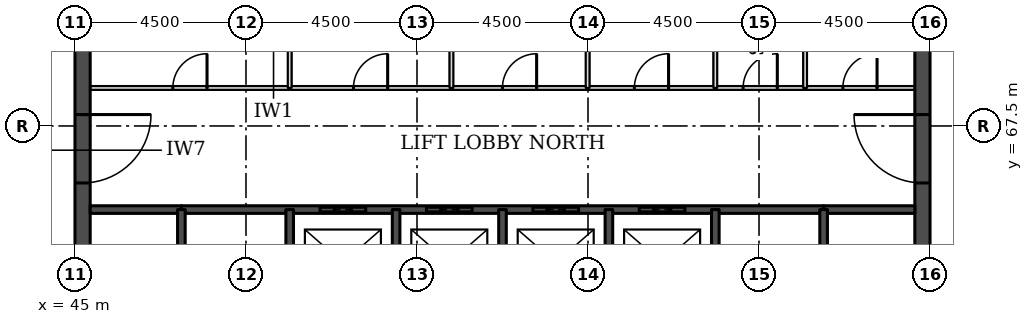
"""IFC4 building model, lengths in metres.
Left out: names, types, materials, properties, quantities, classifications, styles, units other than length and angle.
Written with IfcOpenShell. Run it as: python <this file> out.ifc"""

import sys

from ifc_helpers import new_model, si_unit, direction, frame, frame_2d, origin, place, context, subcontext, project, spatial, rectangle, extrude, element, fill, save


model = new_model("IFC4")
c1 = context("Model", 3, precision=1e-05, world=origin(), true_north=direction((0.0, 1.0)))
c2 = subcontext(c1, "Body", "Model", "MODEL_VIEW")
j1 = project(units=[si_unit("LENGTHUNIT", "METRE"), si_unit("PLANEANGLEUNIT", "RADIAN")], contexts=[c1])
p1 = place(None, origin())
s1 = spatial("IfcSite", under=j1, at=p1, CompositionType="ELEMENT")
p2 = place(p1, origin())
s2 = spatial("IfcBuilding", under=s1, at=p2, CompositionType="ELEMENT")
p3 = place(p2, frame((0.0, 0.0, 203.2)))
s3 = spatial("IfcBuildingStorey", under=s2, at=p3, CompositionType="ELEMENT", Elevation=203.2)
p4 = place(p3, frame((45.2, 49.5, 0.0), z_axis=(0.0, 0.0, 1.0), x_axis=(0.0, 1.0, 0.0)))
e1 = element("IfcWall", 1, at=p4, inside=s3, PredefinedType="SHEAR", context=c2, shape_type="SweptSolid", body=[
    extrude(rectangle(XDim=22.5, YDim=0.4, at=frame_2d((11.25, 0.0))), origin(), (0.0, 0.0, 1.0), 3.7),
])
p5 = place(p4, frame((4.2, 0.0, 0.0)))
e2 = element("IfcOpeningElement", 2, at=p5, cuts=e1, PredefinedType="OPENING", context=c2, shape_type="SweptSolid", body=[
    extrude(rectangle(XDim=1.8, YDim=2.1, at=frame_2d((0.9, 1.05))), frame((0.0, 0.21, 0.0), z_axis=(0.0, -1.0, 0.0), x_axis=(1.0, 0.0, 0.0)), (0.0, 0.0, 1.0), 0.42),
])
p6 = place(p4, frame((6.9, 0.0, 0.0)))
e3 = element("IfcOpeningElement", 3, at=p6, cuts=e1, PredefinedType="OPENING", context=c2, shape_type="SweptSolid", body=[
    extrude(rectangle(XDim=1.1, YDim=2.1, at=frame_2d((0.55, 1.05))), frame((0.0, 0.21, 0.0), z_axis=(0.0, -1.0, 0.0), x_axis=(1.0, 0.0, 0.0)), (0.0, 0.0, 1.0), 0.42),
])
p7 = place(p4, frame((13.6, 0.0, 0.0)))
e4 = element("IfcOpeningElement", 4, at=p7, cuts=e1, PredefinedType="OPENING", context=c2, shape_type="SweptSolid", body=[
    extrude(rectangle(XDim=1.1, YDim=2.1, at=frame_2d((0.55, 1.05))), frame((0.0, 0.21, 0.0), z_axis=(0.0, -1.0, 0.0), x_axis=(1.0, 0.0, 0.0)), (0.0, 0.0, 1.0), 0.42),
])
p8 = place(p4, frame((16.5, 0.0, 0.0)))
e5 = element("IfcOpeningElement", 5, at=p8, cuts=e1, PredefinedType="OPENING", context=c2, shape_type="SweptSolid", body=[
    extrude(rectangle(XDim=1.8, YDim=2.1, at=frame_2d((0.9, 1.05))), frame((0.0, 0.21, 0.0), z_axis=(0.0, -1.0, 0.0), x_axis=(1.0, 0.0, 0.0)), (0.0, 0.0, 1.0), 0.42),
])
p9 = place(p3, frame((67.3, 49.5, 0.0), z_axis=(0.0, 0.0, 1.0), x_axis=(0.0, 1.0, 0.0)))
e6 = element("IfcWall", 6, at=p9, inside=s3, PredefinedType="SHEAR", context=c2, shape_type="SweptSolid", body=[
    extrude(rectangle(XDim=22.5, YDim=0.4, at=frame_2d((11.25, 0.0))), origin(), (0.0, 0.0, 1.0), 3.7),
])
p10 = place(p9, frame((4.2, 0.0, 0.0)))
e7 = element("IfcOpeningElement", 7, at=p10, cuts=e6, PredefinedType="OPENING", context=c2, shape_type="SweptSolid", body=[
    extrude(rectangle(XDim=1.8, YDim=2.1, at=frame_2d((0.9, 1.05))), frame((0.0, 0.21, 0.0), z_axis=(0.0, -1.0, 0.0), x_axis=(1.0, 0.0, 0.0)), (0.0, 0.0, 1.0), 0.42),
])
p11 = place(p9, frame((6.9, 0.0, 0.0)))
e8 = element("IfcOpeningElement", 8, at=p11, cuts=e6, PredefinedType="OPENING", context=c2, shape_type="SweptSolid", body=[
    extrude(rectangle(XDim=1.1, YDim=2.1, at=frame_2d((0.55, 1.05))), frame((0.0, 0.21, 0.0), z_axis=(0.0, -1.0, 0.0), x_axis=(1.0, 0.0, 0.0)), (0.0, 0.0, 1.0), 0.42),
])
p12 = place(p9, frame((13.6, 0.0, 0.0)))
e9 = element("IfcOpeningElement", 9, at=p12, cuts=e6, PredefinedType="OPENING", context=c2, shape_type="SweptSolid", body=[
    extrude(rectangle(XDim=1.1, YDim=2.1, at=frame_2d((0.55, 1.05))), frame((0.0, 0.21, 0.0), z_axis=(0.0, -1.0, 0.0), x_axis=(1.0, 0.0, 0.0)), (0.0, 0.0, 1.0), 0.42),
])
p13 = place(p9, frame((16.5, 0.0, 0.0)))
e10 = element("IfcOpeningElement", 10, at=p13, cuts=e6, PredefinedType="OPENING", context=c2, shape_type="SweptSolid", body=[
    extrude(rectangle(XDim=1.8, YDim=2.1, at=frame_2d((0.9, 1.05))), frame((0.0, 0.21, 0.0), z_axis=(0.0, -1.0, 0.0), x_axis=(1.0, 0.0, 0.0)), (0.0, 0.0, 1.0), 0.42),
])
for number, where, z_axis, x_axis in (
    (11, (45.4, 65.3, 0.0), (0.0, 0.0, 1.0), (1.0, 0.0, 0.0)),
    (12, (64.7, 65.3, 0.0), (0.0, 0.0, 1.0), (1.0, 0.0, 0.0)),
):
    element("IfcWall", number, at=place(p3, frame(where, z_axis=z_axis, x_axis=x_axis)), inside=s3, PredefinedType="SOLIDWALL", context=c2, shape_type="SweptSolid", body=[
        extrude(rectangle(XDim=2.4, YDim=0.2, at=frame_2d((1.2, 0.0))), origin(), (0.0, 0.0, 1.0), 3.55),
    ])
p14 = place(p3, frame((47.8, 65.3, 0.0), z_axis=(0.0, 0.0, 1.0), x_axis=(1.0, 0.0, 0.0)))
e13 = element("IfcWall", 13, at=p14, inside=s3, PredefinedType="SOLIDWALL", context=c2, shape_type="SweptSolid", body=[
    extrude(rectangle(XDim=16.9, YDim=0.2, at=frame_2d((8.45, 0.0))), origin(), (0.0, 0.0, 1.0), 3.55),
])
p15 = place(p14, frame((3.65, 0.0, 0.0)))
e14 = element("IfcOpeningElement", 14, at=p15, cuts=e13, PredefinedType="OPENING", context=c2, shape_type="SweptSolid", body=[
    extrude(rectangle(XDim=1.2, YDim=2.1, at=frame_2d((0.6, 1.05))), frame((0.0, 0.11, 0.0), z_axis=(0.0, -1.0, 0.0), x_axis=(1.0, 0.0, 0.0)), (0.0, 0.0, 1.0), 0.22),
])
p16 = place(p14, frame((6.45, 0.0, 0.0)))
e15 = element("IfcOpeningElement", 15, at=p16, cuts=e13, PredefinedType="OPENING", context=c2, shape_type="SweptSolid", body=[
    extrude(rectangle(XDim=1.2, YDim=2.1, at=frame_2d((0.6, 1.05))), frame((0.0, 0.11, 0.0), z_axis=(0.0, -1.0, 0.0), x_axis=(1.0, 0.0, 0.0)), (0.0, 0.0, 1.0), 0.22),
])
p17 = place(p14, frame((9.25, 0.0, 0.0)))
e16 = element("IfcOpeningElement", 16, at=p17, cuts=e13, PredefinedType="OPENING", context=c2, shape_type="SweptSolid", body=[
    extrude(rectangle(XDim=1.2, YDim=2.1, at=frame_2d((0.6, 1.05))), frame((0.0, 0.11, 0.0), z_axis=(0.0, -1.0, 0.0), x_axis=(1.0, 0.0, 0.0)), (0.0, 0.0, 1.0), 0.22),
])
p18 = place(p14, frame((12.05, 0.0, 0.0)))
e17 = element("IfcOpeningElement", 17, at=p18, cuts=e13, PredefinedType="OPENING", context=c2, shape_type="SweptSolid", body=[
    extrude(rectangle(XDim=1.2, YDim=2.1, at=frame_2d((0.6, 1.05))), frame((0.0, 0.11, 0.0), z_axis=(0.0, -1.0, 0.0), x_axis=(1.0, 0.0, 0.0)), (0.0, 0.0, 1.0), 0.22),
])
p19 = place(p3, frame((45.4, 68.5, 0.0), z_axis=(0.0, 0.0, 1.0), x_axis=(1.0, 0.0, 0.0)))
e18 = element("IfcWall", 18, at=p19, inside=s3, PredefinedType="PARTITIONING", context=c2, shape_type="SweptSolid", body=[
    extrude(rectangle(XDim=21.7, YDim=0.1, at=frame_2d((10.85, 0.0))), origin(), (0.0, 0.0, 1.0), 3.55),
])
p20 = place(p19, frame((19.806, 0.0, 0.0)))
e19 = element("IfcOpeningElement", 19, at=p20, cuts=e18, PredefinedType="OPENING", context=c2, shape_type="SweptSolid", body=[
    extrude(rectangle(XDim=0.9, YDim=2.1, at=frame_2d((0.45, 1.05))), frame((0.0, 0.06, 0.0), z_axis=(0.0, -1.0, 0.0), x_axis=(1.0, 0.0, 0.0)), (0.0, 0.0, 1.0), 0.12),
])
p21 = place(p19, frame((17.181, 0.0, 0.0)))
e20 = element("IfcOpeningElement", 20, at=p21, cuts=e18, PredefinedType="OPENING", context=c2, shape_type="SweptSolid", body=[
    extrude(rectangle(XDim=0.9, YDim=2.1, at=frame_2d((0.45, 1.05))), frame((0.0, 0.06, 0.0), z_axis=(0.0, -1.0, 0.0), x_axis=(1.0, 0.0, 0.0)), (0.0, 0.0, 1.0), 0.12),
])
p22 = place(p19, frame((2.175, 0.0, 0.0)))
e21 = element("IfcOpeningElement", 21, at=p22, cuts=e18, PredefinedType="OPENING", context=c2, shape_type="SweptSolid", body=[
    extrude(rectangle(XDim=0.9, YDim=2.1, at=frame_2d((0.45, 1.05))), frame((0.0, 0.06, 0.0), z_axis=(0.0, -1.0, 0.0), x_axis=(1.0, 0.0, 0.0)), (0.0, 0.0, 1.0), 0.12),
])
p23 = place(p19, frame((14.32, 0.0, 0.0)))
e22 = element("IfcOpeningElement", 22, at=p23, cuts=e18, PredefinedType="OPENING", context=c2, shape_type="SweptSolid", body=[
    extrude(rectangle(XDim=0.9, YDim=2.1, at=frame_2d((0.45, 1.05))), frame((0.0, 0.06, 0.0), z_axis=(0.0, -1.0, 0.0), x_axis=(1.0, 0.0, 0.0)), (0.0, 0.0, 1.0), 0.12),
])
p24 = place(p19, frame((10.848, 0.0, 0.0)))
e23 = element("IfcOpeningElement", 23, at=p24, cuts=e18, PredefinedType="OPENING", context=c2, shape_type="SweptSolid", body=[
    extrude(rectangle(XDim=0.9, YDim=2.1, at=frame_2d((0.45, 1.05))), frame((0.0, 0.06, 0.0), z_axis=(0.0, -1.0, 0.0), x_axis=(1.0, 0.0, 0.0)), (0.0, 0.0, 1.0), 0.12),
])
p25 = place(p19, frame((6.928, 0.0, 0.0)))
e24 = element("IfcOpeningElement", 24, at=p25, cuts=e18, PredefinedType="OPENING", context=c2, shape_type="SweptSolid", body=[
    extrude(rectangle(XDim=0.9, YDim=2.1, at=frame_2d((0.45, 1.05))), frame((0.0, 0.06, 0.0), z_axis=(0.0, -1.0, 0.0), x_axis=(1.0, 0.0, 0.0)), (0.0, 0.0, 1.0), 0.12),
])
p26 = place(p3, frame((47.8, 62.0, 0.0), z_axis=(0.0, 0.0, 1.0), x_axis=(0.0, 1.0, 0.0)))
e25 = element("IfcWall", 25, at=p26, inside=s3, PredefinedType="SOLIDWALL", context=c2, shape_type="SweptSolid", body=[
    extrude(rectangle(XDim=3.3, YDim=0.2, at=frame_2d((1.65, 0.0))), origin(), (0.0, 0.0, 1.0), 3.55),
])
p27 = place(p26, frame((1.1, 0.0, 0.0)))
e26 = element("IfcOpeningElement", 26, at=p27, cuts=e25, PredefinedType="OPENING", context=c2, shape_type="SweptSolid", body=[
    extrude(rectangle(XDim=1.1, YDim=2.1, at=frame_2d((0.55, 1.05))), frame((0.0, 0.11, 0.0), z_axis=(0.0, -1.0, 0.0), x_axis=(1.0, 0.0, 0.0)), (0.0, 0.0, 1.0), 0.22),
])
p28 = place(p3, frame((50.65, 68.5, 0.0), z_axis=(0.0, 0.0, 1.0), x_axis=(0.0, 1.0, 0.0)))
e27 = element("IfcWall", 27, at=p28, inside=s3, PredefinedType="PARTITIONING", context=c2, shape_type="SweptSolid", body=[
    extrude(rectangle(XDim=3.1, YDim=0.1, at=frame_2d((1.55, 0.0))), origin(), (0.0, 0.0, 1.0), 3.55),
])
p29 = place(p3, frame((50.65, 62.0, 0.0), z_axis=(0.0, 0.0, 1.0), x_axis=(0.0, 1.0, 0.0)))
e28 = element("IfcWall", 28, at=p29, inside=s3, PredefinedType="SOLIDWALL", context=c2, shape_type="SweptSolid", body=[
    extrude(rectangle(XDim=3.3, YDim=0.2, at=frame_2d((1.65, 0.0))), origin(), (0.0, 0.0, 1.0), 3.55),
])
p30 = place(p3, frame((53.45, 62.5, 0.0), z_axis=(0.0, 0.0, 1.0), x_axis=(0.0, 1.0, 0.0)))
e29 = element("IfcWall", 29, at=p30, inside=s3, PredefinedType="SOLIDWALL", context=c2, shape_type="SweptSolid", body=[
    extrude(rectangle(XDim=2.8, YDim=0.2, at=frame_2d((1.4, 0.0))), origin(), (0.0, 0.0, 1.0), 3.55),
])
p31 = place(p3, frame((54.906, 68.5, 0.0), z_axis=(0.0, 0.0, 1.0), x_axis=(0.0, 1.0, 0.0)))
e30 = element("IfcWall", 30, at=p31, inside=s3, PredefinedType="PARTITIONING", context=c2, shape_type="SweptSolid", body=[
    extrude(rectangle(XDim=3.1, YDim=0.1, at=frame_2d((1.55, 0.0))), origin(), (0.0, 0.0, 1.0), 3.55),
])
p32 = place(p3, frame((56.25, 62.5, 0.0), z_axis=(0.0, 0.0, 1.0), x_axis=(0.0, 1.0, 0.0)))
e31 = element("IfcWall", 31, at=p32, inside=s3, PredefinedType="SOLIDWALL", context=c2, shape_type="SweptSolid", body=[
    extrude(rectangle(XDim=2.8, YDim=0.2, at=frame_2d((1.4, 0.0))), origin(), (0.0, 0.0, 1.0), 3.55),
])
p33 = place(p3, frame((58.49, 68.5, 0.0), z_axis=(0.0, 0.0, 1.0), x_axis=(0.0, 1.0, 0.0)))
e32 = element("IfcWall", 32, at=p33, inside=s3, PredefinedType="PARTITIONING", context=c2, shape_type="SweptSolid", body=[
    extrude(rectangle(XDim=3.1, YDim=0.1, at=frame_2d((1.55, 0.0))), origin(), (0.0, 0.0, 1.0), 3.55),
])
p34 = place(p3, frame((59.05, 62.5, 0.0), z_axis=(0.0, 0.0, 1.0), x_axis=(0.0, 1.0, 0.0)))
e33 = element("IfcWall", 33, at=p34, inside=s3, PredefinedType="SOLIDWALL", context=c2, shape_type="SweptSolid", body=[
    extrude(rectangle(XDim=2.8, YDim=0.2, at=frame_2d((1.4, 0.0))), origin(), (0.0, 0.0, 1.0), 3.55),
])
p35 = place(p3, frame((61.85, 68.5, 0.0), z_axis=(0.0, 0.0, 1.0), x_axis=(0.0, 1.0, 0.0)))
e34 = element("IfcWall", 34, at=p35, inside=s3, PredefinedType="PARTITIONING", context=c2, shape_type="SweptSolid", body=[
    extrude(rectangle(XDim=3.1, YDim=0.1, at=frame_2d((1.55, 0.0))), origin(), (0.0, 0.0, 1.0), 3.55),
])
p36 = place(p3, frame((61.85, 62.0, 0.0), z_axis=(0.0, 0.0, 1.0), x_axis=(0.0, 1.0, 0.0)))
e35 = element("IfcWall", 35, at=p36, inside=s3, PredefinedType="SOLIDWALL", context=c2, shape_type="SweptSolid", body=[
    extrude(rectangle(XDim=3.3, YDim=0.2, at=frame_2d((1.65, 0.0))), origin(), (0.0, 0.0, 1.0), 3.55),
])
p37 = place(p3, frame((64.212, 68.5, 0.0), z_axis=(0.0, 0.0, 1.0), x_axis=(0.0, 1.0, 0.0)))
e36 = element("IfcWall", 36, at=p37, inside=s3, PredefinedType="PARTITIONING", context=c2, shape_type="SweptSolid", body=[
    extrude(rectangle(XDim=3.1, YDim=0.1, at=frame_2d((1.55, 0.0))), origin(), (0.0, 0.0, 1.0), 3.55),
])
p38 = place(p3, frame((64.7, 62.0, 0.0), z_axis=(0.0, 0.0, 1.0), x_axis=(0.0, 1.0, 0.0)))
e37 = element("IfcWall", 37, at=p38, inside=s3, PredefinedType="SOLIDWALL", context=c2, shape_type="SweptSolid", body=[
    extrude(rectangle(XDim=3.3, YDim=0.2, at=frame_2d((1.65, 0.0))), origin(), (0.0, 0.0, 1.0), 3.55),
])
p39 = place(p38, frame((1.1, 0.0, 0.0)))
e38 = element("IfcOpeningElement", 38, at=p39, cuts=e37, PredefinedType="OPENING", context=c2, shape_type="SweptSolid", body=[
    extrude(rectangle(XDim=1.1, YDim=2.1, at=frame_2d((0.55, 1.05))), frame((0.0, 0.11, 0.0), z_axis=(0.0, -1.0, 0.0), x_axis=(1.0, 0.0, 0.0)), (0.0, 0.0, 1.0), 0.22),
])
p40 = place(p15, origin())
e39 = element("IfcDoor", 39, at=p40, inside=s3, OperationType="DOUBLE_DOOR_SLIDING", PredefinedType="DOOR", context=c2, shape_type="SweptSolid", body=[
    extrude(rectangle(XDim=1.2, YDim=2.1, at=frame_2d((0.6, 1.05))), frame((0.0, 0.025, 0.0), z_axis=(0.0, -1.0, 0.0), x_axis=(1.0, 0.0, 0.0)), (0.0, 0.0, 1.0), 0.05),
])
fill(e14, e39)
p41 = place(p16, origin())
e40 = element("IfcDoor", 40, at=p41, inside=s3, OperationType="DOUBLE_DOOR_SLIDING", PredefinedType="DOOR", context=c2, shape_type="SweptSolid", body=[
    extrude(rectangle(XDim=1.2, YDim=2.1, at=frame_2d((0.6, 1.05))), frame((0.0, 0.025, 0.0), z_axis=(0.0, -1.0, 0.0), x_axis=(1.0, 0.0, 0.0)), (0.0, 0.0, 1.0), 0.05),
])
fill(e15, e40)
p42 = place(p17, origin())
e41 = element("IfcDoor", 41, at=p42, inside=s3, OperationType="DOUBLE_DOOR_SLIDING", PredefinedType="DOOR", context=c2, shape_type="SweptSolid", body=[
    extrude(rectangle(XDim=1.2, YDim=2.1, at=frame_2d((0.6, 1.05))), frame((0.0, 0.025, 0.0), z_axis=(0.0, -1.0, 0.0), x_axis=(1.0, 0.0, 0.0)), (0.0, 0.0, 1.0), 0.05),
])
fill(e16, e41)
p43 = place(p18, origin())
e42 = element("IfcDoor", 42, at=p43, inside=s3, OperationType="DOUBLE_DOOR_SLIDING", PredefinedType="DOOR", context=c2, shape_type="SweptSolid", body=[
    extrude(rectangle(XDim=1.2, YDim=2.1, at=frame_2d((0.6, 1.05))), frame((0.0, 0.025, 0.0), z_axis=(0.0, -1.0, 0.0), x_axis=(1.0, 0.0, 0.0)), (0.0, 0.0, 1.0), 0.05),
])
fill(e17, e42)
p44 = place(p8, frame((1.8, 0.0, 0.0), z_axis=(0.0, 0.0, 1.0), x_axis=(-1.0, 0.0, 0.0)))
e43 = element("IfcDoor", 43, at=p44, inside=s3, OperationType="SINGLE_SWING_LEFT", PredefinedType="DOOR", context=c2, shape_type="SweptSolid", body=[
    extrude(rectangle(XDim=1.8, YDim=2.1, at=frame_2d((0.9, 1.05))), frame((0.0, 0.025, 0.0), z_axis=(0.0, -1.0, 0.0), x_axis=(1.0, 0.0, 0.0)), (0.0, 0.0, 1.0), 0.05),
])
fill(e5, e43)
p45 = place(p13, origin())
e44 = element("IfcDoor", 44, at=p45, inside=s3, OperationType="SINGLE_SWING_RIGHT", PredefinedType="DOOR", context=c2, shape_type="SweptSolid", body=[
    extrude(rectangle(XDim=1.8, YDim=2.1, at=frame_2d((0.9, 1.05))), frame((0.0, 0.025, 0.0), z_axis=(0.0, -1.0, 0.0), x_axis=(1.0, 0.0, 0.0)), (0.0, 0.0, 1.0), 0.05),
])
fill(e10, e44)
p46 = place(p20, origin())
e45 = element("IfcDoor", 45, at=p46, inside=s3, OperationType="SINGLE_SWING_RIGHT", PredefinedType="DOOR", context=c2, shape_type="SweptSolid", body=[
    extrude(rectangle(XDim=0.9, YDim=2.1, at=frame_2d((0.45, 1.05))), frame((0.0, 0.025, 0.0), z_axis=(0.0, -1.0, 0.0), x_axis=(1.0, 0.0, 0.0)), (0.0, 0.0, 1.0), 0.05),
])
fill(e19, e45)
p47 = place(p21, origin())
e46 = element("IfcDoor", 46, at=p47, inside=s3, OperationType="SINGLE_SWING_RIGHT", PredefinedType="DOOR", context=c2, shape_type="SweptSolid", body=[
    extrude(rectangle(XDim=0.9, YDim=2.1, at=frame_2d((0.45, 1.05))), frame((0.0, 0.025, 0.0), z_axis=(0.0, -1.0, 0.0), x_axis=(1.0, 0.0, 0.0)), (0.0, 0.0, 1.0), 0.05),
])
fill(e20, e46)
p48 = place(p22, origin())
e47 = element("IfcDoor", 47, at=p48, inside=s3, OperationType="SINGLE_SWING_RIGHT", PredefinedType="DOOR", context=c2, shape_type="SweptSolid", body=[
    extrude(rectangle(XDim=0.9, YDim=2.1, at=frame_2d((0.45, 1.05))), frame((0.0, 0.025, 0.0), z_axis=(0.0, -1.0, 0.0), x_axis=(1.0, 0.0, 0.0)), (0.0, 0.0, 1.0), 0.05),
])
fill(e21, e47)
p49 = place(p23, origin())
e48 = element("IfcDoor", 48, at=p49, inside=s3, OperationType="SINGLE_SWING_RIGHT", PredefinedType="DOOR", context=c2, shape_type="SweptSolid", body=[
    extrude(rectangle(XDim=0.9, YDim=2.1, at=frame_2d((0.45, 1.05))), frame((0.0, 0.025, 0.0), z_axis=(0.0, -1.0, 0.0), x_axis=(1.0, 0.0, 0.0)), (0.0, 0.0, 1.0), 0.05),
])
fill(e22, e48)
p50 = place(p24, origin())
e49 = element("IfcDoor", 49, at=p50, inside=s3, OperationType="SINGLE_SWING_RIGHT", PredefinedType="DOOR", context=c2, shape_type="SweptSolid", body=[
    extrude(rectangle(XDim=0.9, YDim=2.1, at=frame_2d((0.45, 1.05))), frame((0.0, 0.025, 0.0), z_axis=(0.0, -1.0, 0.0), x_axis=(1.0, 0.0, 0.0)), (0.0, 0.0, 1.0), 0.05),
])
fill(e23, e49)
p51 = place(p25, origin())
e50 = element("IfcDoor", 50, at=p51, inside=s3, OperationType="SINGLE_SWING_RIGHT", PredefinedType="DOOR", context=c2, shape_type="SweptSolid", body=[
    extrude(rectangle(XDim=0.9, YDim=2.1, at=frame_2d((0.45, 1.05))), frame((0.0, 0.025, 0.0), z_axis=(0.0, -1.0, 0.0), x_axis=(1.0, 0.0, 0.0)), (0.0, 0.0, 1.0), 0.05),
])
fill(e24, e50)
save(model, sys.argv[1])
